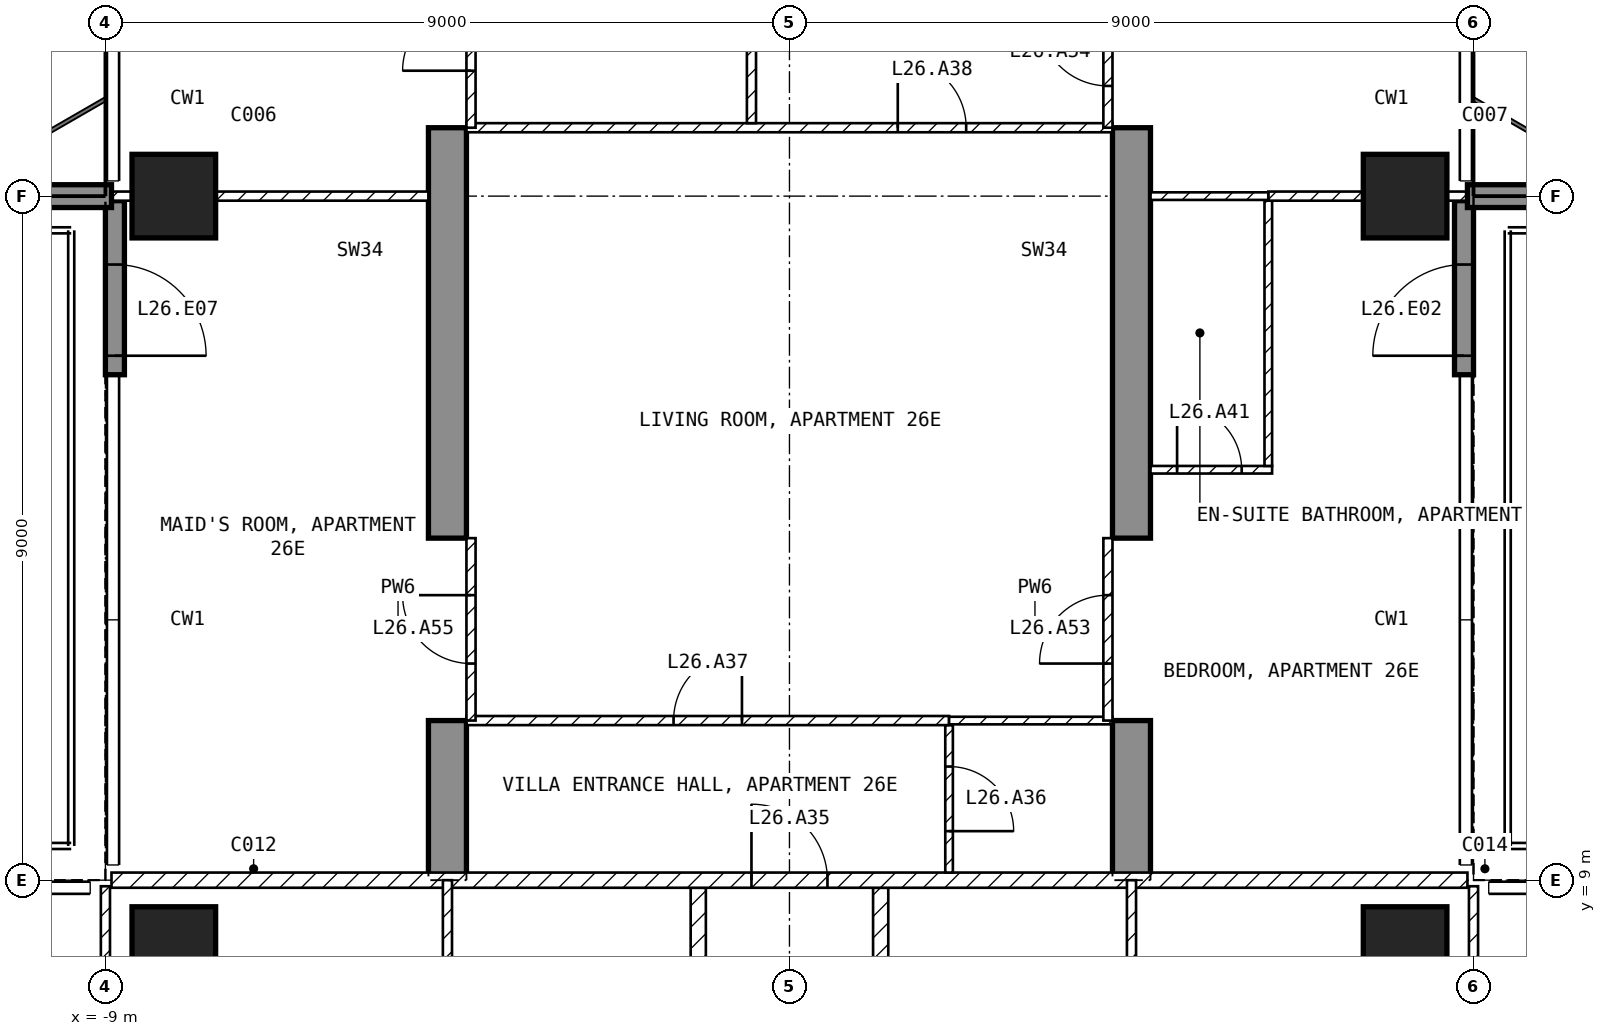
"""IFC4 building model, lengths in metres.
Left out: names, types, materials, properties, quantities, classifications, styles, units other than length and angle.
Written with IfcOpenShell. Run it as: python <this file> out.ifc"""

import sys

from ifc_helpers import new_model, si_unit, direction, frame, frame_2d, origin, origin_2d, place, context, subcontext, project, spatial, polyline, rectangle, outline, extrude, element, fill, save


model = new_model("IFC4")
c1 = context("Model", 3, precision=1e-05, world=origin(), true_north=direction((0.0, 1.0)))
c2 = subcontext(c1, "Body", "Model", "MODEL_VIEW")
j1 = project(units=[si_unit("LENGTHUNIT", "METRE"), si_unit("PLANEANGLEUNIT", "RADIAN")], contexts=[c1])
p1 = place(None, origin())
s1 = spatial("IfcSite", under=j1, at=p1, CompositionType="ELEMENT")
p2 = place(p1, origin())
s2 = spatial("IfcBuilding", under=s1, at=p2, CompositionType="ELEMENT")
p3 = place(p2, frame((0.0, 0.0, 112.9)))
s3 = spatial("IfcBuildingStorey", under=s2, at=p3, CompositionType="ELEMENT", Elevation=112.9)
for number, where, z_axis, x_axis in (
    (1, (-8.1, 8.1, -0.25), (0.0, 0.0, 1.0), (1.0, 0.0, 0.0)),
    (2, (-8.1, 18.0, -0.25), (0.0, 0.0, 1.0), (1.0, 0.0, 0.0)),
    (3, (8.1, 8.1, -0.25), (0.0, 0.0, 1.0), (1.0, 0.0, 0.0)),
    (4, (8.1, 18.0, -0.25), (0.0, 0.0, 1.0), (1.0, 0.0, 0.0)),
):
    element("IfcColumn", number, at=place(p3, frame(where, z_axis=z_axis, x_axis=x_axis)), inside=s3, PredefinedType="COLUMN", context=c2, shape_type="SweptSolid", body=[
        extrude(rectangle(XDim=1.1, YDim=1.1, at=origin_2d()), origin(), (0.0, 0.0, 1.0), 3.5),
    ])
for number, where, z_axis, x_axis in (
    (5, (-4.75, 9.0, -0.25), (1.0, 0.0, 0.0), (0.0, 1.0, 0.0)),
    (6, (4.25, 9.0, -0.25), (1.0, 0.0, 0.0), (0.0, 1.0, 0.0)),
):
    element("IfcWall", number, at=place(p3, frame(where, z_axis=z_axis, x_axis=x_axis)), inside=s3, PredefinedType="SHEAR", context=c2, shape_type="SweptSolid", body=[
        extrude(outline(polyline([(0.0, 0.0), (2.1, 0.0), (2.1, 2.65), (4.5, 2.65), (4.5, 0.0), (9.9, 0.0), (9.9, 2.65), (12.3, 2.65), (12.3, 0.0), (16.55, 0.0), (16.55, 3.5), (0.0, 3.5), (0.0, 0.0)])), origin(), (0.0, 0.0, 1.0), 0.5),
    ])
p4 = place(p3, frame((8.875, 15.65, 0.0), z_axis=(0.0, 0.0, 1.0), x_axis=(0.0, 1.0, 0.0)))
e7 = element("IfcWall", 7, at=p4, inside=s3, PredefinedType="SOLIDWALL", context=c2, shape_type="SweptSolid", body=[
    extrude(rectangle(XDim=2.29, YDim=0.25, at=frame_2d((1.145, 0.0))), origin(), (0.0, 0.0, 1.0), 3.25),
])
p5 = place(p4, frame((0.25, 0.0, 0.0)))
e8 = element("IfcOpeningElement", 8, at=p5, cuts=e7, PredefinedType="OPENING", context=c2, shape_type="SweptSolid", body=[
    extrude(rectangle(XDim=1.2, YDim=2.4, at=frame_2d((0.6, 1.2))), frame((0.0, 0.135, 0.0), z_axis=(0.0, -1.0, 0.0), x_axis=(1.0, 0.0, 0.0)), (0.0, 0.0, 1.0), 0.27),
])
p6 = place(p3, frame((-8.875, 17.94, 0.0), z_axis=(0.0, 0.0, 1.0), x_axis=(0.0, -1.0, 0.0)))
e9 = element("IfcWall", 9, at=p6, inside=s3, PredefinedType="SOLIDWALL", context=c2, shape_type="SweptSolid", body=[
    extrude(rectangle(XDim=2.29, YDim=0.25, at=frame_2d((1.145, 0.0))), origin(), (0.0, 0.0, 1.0), 3.25),
])
p7 = place(p6, frame((0.84, 0.0, 0.0)))
e10 = element("IfcOpeningElement", 10, at=p7, cuts=e9, PredefinedType="OPENING", context=c2, shape_type="SweptSolid", body=[
    extrude(rectangle(XDim=1.2, YDim=2.4, at=frame_2d((0.6, 1.2))), frame((0.0, 0.135, 0.0), z_axis=(0.0, -1.0, 0.0), x_axis=(1.0, 0.0, 0.0)), (0.0, 0.0, 1.0), 0.27),
])
for number, where, z_axis, x_axis in (
    (11, (-8.92, 18.0, 0.0), (0.0, 0.0, 1.0), (-1.0, 0.0, 0.0)),
    (12, (8.92, 18.0, 0.0), (0.0, 0.0, 1.0), (1.0, 0.0, 0.0)),
):
    element("IfcWall", number, at=place(p3, frame(where, z_axis=z_axis, x_axis=x_axis)), inside=s3, PredefinedType="SOLIDWALL", context=c2, shape_type="SweptSolid", body=[
        extrude(rectangle(XDim=2.82, YDim=0.3, at=frame_2d((1.41, 0.0))), origin(), (0.0, 0.0, 1.0), 3.25),
    ])
for number, where, z_axis, x_axis in (
    (13, (1.2, 8.9, 0.0), (0.0, 0.0, 1.0), (0.0, -1.0, 0.0)),
    (14, (-1.2, 4.6, 0.0), (0.0, 0.0, 1.0), (0.0, 1.0, 0.0)),
):
    element("IfcWall", number, at=place(p3, frame(where, z_axis=z_axis, x_axis=x_axis)), inside=s3, PredefinedType="PARTITIONING", context=c2, shape_type="SweptSolid", body=[
        extrude(rectangle(XDim=4.3, YDim=0.2, at=frame_2d((2.15, 0.0))), origin(), (0.0, 0.0, 1.0), 3.25),
    ])
p8 = place(p3, frame((-8.92, 9.0, 0.0), z_axis=(0.0, 0.0, 1.0), x_axis=(1.0, 0.0, 0.0)))
e15 = element("IfcWall", 15, at=p8, inside=s3, PredefinedType="PARTITIONING", context=c2, shape_type="SweptSolid", body=[
    extrude(rectangle(XDim=17.84, YDim=0.2, at=frame_2d((8.92, 0.0))), origin(), (0.0, 0.0, 1.0), 3.25),
])
p9 = place(p8, frame((8.42, 0.0, 0.0)))
e16 = element("IfcOpeningElement", 16, at=p9, cuts=e15, PredefinedType="OPENING", context=c2, shape_type="SweptSolid", body=[
    extrude(rectangle(XDim=1.0, YDim=2.1, at=frame_2d((0.5, 1.05))), frame((0.0, 0.11, 0.0), z_axis=(0.0, -1.0, 0.0), x_axis=(1.0, 0.0, 0.0)), (0.0, 0.0, 1.0), 0.22),
])
p10 = place(p3, frame((9.0, 1.3, 0.0), z_axis=(0.0, 0.0, 1.0), x_axis=(0.0, 1.0, 0.0)))
e17 = element("IfcWall", 17, at=p10, inside=s3, PredefinedType="PARTITIONING", context=c2, shape_type="SweptSolid", body=[
    extrude(rectangle(XDim=7.62, YDim=0.12, at=frame_2d((3.81, 0.0))), origin(), (0.0, 0.0, 1.0), 3.25),
])
p11 = place(p10, frame((1.15, 0.0, 0.0)))
e18 = element("IfcOpeningElement", 18, at=p11, cuts=e17, PredefinedType="OPENING", context=c2, shape_type="SweptSolid", body=[
    extrude(rectangle(XDim=0.9, YDim=2.1, at=frame_2d((0.45, 1.05))), frame((0.0, 0.07, 0.0), z_axis=(0.0, -1.0, 0.0), x_axis=(1.0, 0.0, 0.0)), (0.0, 0.0, 1.0), 0.14),
])
p12 = place(p3, frame((4.5, 4.5, 0.0), z_axis=(0.0, 0.0, 1.0), x_axis=(0.0, 1.0, 0.0)))
e19 = element("IfcWall", 19, at=p12, inside=s3, PredefinedType="PARTITIONING", context=c2, shape_type="SweptSolid", body=[
    extrude(rectangle(XDim=4.5, YDim=0.12, at=frame_2d((2.25, 0.0))), origin(), (0.0, 0.0, 1.0), 3.25),
])
p13 = place(p12, frame((0.24, 0.0, 0.0)))
e20 = element("IfcOpeningElement", 20, at=p13, cuts=e19, PredefinedType="OPENING", context=c2, shape_type="SweptSolid", body=[
    extrude(rectangle(XDim=0.9, YDim=2.1, at=frame_2d((0.45, 1.05))), frame((0.0, 0.07, 0.0), z_axis=(0.0, -1.0, 0.0), x_axis=(1.0, 0.0, 0.0)), (0.0, 0.0, 1.0), 0.14),
])
p14 = place(p3, frame((-9.0, 8.92, 0.0), z_axis=(0.0, 0.0, 1.0), x_axis=(0.0, -1.0, 0.0)))
e21 = element("IfcWall", 21, at=p14, inside=s3, PredefinedType="PARTITIONING", context=c2, shape_type="SweptSolid", body=[
    extrude(rectangle(XDim=7.62, YDim=0.12, at=frame_2d((3.81, 0.0))), origin(), (0.0, 0.0, 1.0), 3.25),
])
p15 = place(p14, frame((2.52, 0.0, 0.0)))
e22 = element("IfcOpeningElement", 22, at=p15, cuts=e21, PredefinedType="OPENING", context=c2, shape_type="SweptSolid", body=[
    extrude(rectangle(XDim=0.9, YDim=2.1, at=frame_2d((0.45, 1.05))), frame((0.0, 0.07, 0.0), z_axis=(0.0, -1.0, 0.0), x_axis=(1.0, 0.0, 0.0)), (0.0, 0.0, 1.0), 0.14),
])
p16 = place(p3, frame((-4.5, 9.0, 0.0), z_axis=(0.0, 0.0, 1.0), x_axis=(0.0, -1.0, 0.0)))
e23 = element("IfcWall", 23, at=p16, inside=s3, PredefinedType="PARTITIONING", context=c2, shape_type="SweptSolid", body=[
    extrude(rectangle(XDim=4.5, YDim=0.12, at=frame_2d((2.25, 0.0))), origin(), (0.0, 0.0, 1.0), 3.25),
])
p17 = place(p16, frame((1.8, 0.0, 0.0)))
e24 = element("IfcOpeningElement", 24, at=p17, cuts=e23, PredefinedType="OPENING", context=c2, shape_type="SweptSolid", body=[
    extrude(rectangle(XDim=0.9, YDim=2.1, at=frame_2d((0.45, 1.05))), frame((0.0, 0.07, 0.0), z_axis=(0.0, -1.0, 0.0), x_axis=(1.0, 0.0, 0.0)), (0.0, 0.0, 1.0), 0.14),
])
p18 = place(p3, frame((2.1, 11.04, 0.0), z_axis=(0.0, 0.0, 1.0), x_axis=(0.0, -1.0, 0.0)))
e25 = element("IfcWall", 25, at=p18, inside=s3, PredefinedType="PARTITIONING", context=c2, shape_type="SweptSolid", body=[
    extrude(rectangle(XDim=1.94, YDim=0.1, at=frame_2d((0.97, 0.0))), origin(), (0.0, 0.0, 1.0), 3.25),
])
p19 = place(p18, frame((0.545, 0.0, 0.0)))
e26 = element("IfcOpeningElement", 26, at=p19, cuts=e25, PredefinedType="OPENING", context=c2, shape_type="SweptSolid", body=[
    extrude(rectangle(XDim=0.85, YDim=2.1, at=frame_2d((0.425, 1.05))), frame((0.0, 0.06, 0.0), z_axis=(0.0, -1.0, 0.0), x_axis=(1.0, 0.0, 0.0)), (0.0, 0.0, 1.0), 0.12),
])
p20 = place(p3, frame((-4.25, 11.1, 0.0), z_axis=(0.0, 0.0, 1.0), x_axis=(1.0, 0.0, 0.0)))
e27 = element("IfcWall", 27, at=p20, inside=s3, PredefinedType="PARTITIONING", context=c2, shape_type="SweptSolid", body=[
    extrude(rectangle(XDim=6.35, YDim=0.12, at=frame_2d((3.175, 0.0))), origin(), (0.0, 0.0, 1.0), 3.25),
])
p21 = place(p20, frame((2.725, 0.0, 0.0)))
e28 = element("IfcOpeningElement", 28, at=p21, cuts=e27, PredefinedType="OPENING", context=c2, shape_type="SweptSolid", body=[
    extrude(rectangle(XDim=0.9, YDim=2.1, at=frame_2d((0.45, 1.05))), frame((0.0, 0.07, 0.0), z_axis=(0.0, -1.0, 0.0), x_axis=(1.0, 0.0, 0.0)), (0.0, 0.0, 1.0), 0.14),
])
p22 = place(p3, frame((2.1, 11.1, 0.0), z_axis=(0.0, 0.0, 1.0), x_axis=(1.0, 0.0, 0.0)))
e29 = element("IfcWall", 29, at=p22, inside=s3, PredefinedType="PARTITIONING", context=c2, shape_type="SweptSolid", body=[
    extrude(rectangle(XDim=2.15, YDim=0.1, at=frame_2d((1.075, 0.0))), origin(), (0.0, 0.0, 1.0), 3.25),
])
p23 = place(p3, frame((-4.25, 18.9, 0.0), z_axis=(0.0, 0.0, 1.0), x_axis=(1.0, 0.0, 0.0)))
e30 = element("IfcWall", 30, at=p23, inside=s3, PredefinedType="PARTITIONING", context=c2, shape_type="SweptSolid", body=[
    extrude(rectangle(XDim=8.5, YDim=0.12, at=frame_2d((4.25, 0.0))), origin(), (0.0, 0.0, 1.0), 3.25),
])
p24 = place(p23, frame((5.675, 0.0, 0.0)))
e31 = element("IfcOpeningElement", 31, at=p24, cuts=e30, PredefinedType="OPENING", context=c2, shape_type="SweptSolid", body=[
    extrude(rectangle(XDim=0.9, YDim=2.1, at=frame_2d((0.45, 1.05))), frame((0.0, 0.07, 0.0), z_axis=(0.0, -1.0, 0.0), x_axis=(1.0, 0.0, 0.0)), (0.0, 0.0, 1.0), 0.14),
])
p25 = place(p3, frame((-0.5, 18.96, 0.0), z_axis=(0.0, 0.0, 1.0), x_axis=(0.0, 1.0, 0.0)))
e32 = element("IfcWall", 32, at=p25, inside=s3, PredefinedType="PARTITIONING", context=c2, shape_type="SweptSolid", body=[
    extrude(rectangle(XDim=4.38, YDim=0.12, at=frame_2d((2.19, 0.0))), origin(), (0.0, 0.0, 1.0), 3.25),
])
p26 = place(p25, frame((1.74, 0.0, 0.0)))
e33 = element("IfcOpeningElement", 33, at=p26, cuts=e32, PredefinedType="OPENING", context=c2, shape_type="SweptSolid", body=[
    extrude(rectangle(XDim=0.9, YDim=2.1, at=frame_2d((0.45, 1.05))), frame((0.0, 0.07, 0.0), z_axis=(0.0, -1.0, 0.0), x_axis=(1.0, 0.0, 0.0)), (0.0, 0.0, 1.0), 0.14),
])
p27 = place(p3, frame((4.75, 14.4, 0.0), z_axis=(0.0, 0.0, 1.0), x_axis=(1.0, 0.0, 0.0)))
e34 = element("IfcWall", 34, at=p27, inside=s3, PredefinedType="PARTITIONING", context=c2, shape_type="SweptSolid", body=[
    extrude(rectangle(XDim=1.6, YDim=0.1, at=frame_2d((0.8, 0.0))), origin(), (0.0, 0.0, 1.0), 3.25),
])
p28 = place(p27, frame((0.35, 0.0, 0.0)))
e35 = element("IfcOpeningElement", 35, at=p28, cuts=e34, PredefinedType="OPENING", context=c2, shape_type="SweptSolid", body=[
    extrude(rectangle(XDim=0.85, YDim=2.1, at=frame_2d((0.425, 1.05))), frame((0.0, 0.06, 0.0), z_axis=(0.0, -1.0, 0.0), x_axis=(1.0, 0.0, 0.0)), (0.0, 0.0, 1.0), 0.12),
])
p29 = place(p3, frame((6.3, 14.45, 0.0), z_axis=(0.0, 0.0, 1.0), x_axis=(0.0, 1.0, 0.0)))
e36 = element("IfcWall", 36, at=p29, inside=s3, PredefinedType="PARTITIONING", context=c2, shape_type="SweptSolid", body=[
    extrude(rectangle(XDim=3.49, YDim=0.1, at=frame_2d((1.745, 0.0))), origin(), (0.0, 0.0, 1.0), 3.25),
])
p30 = place(p3, frame((6.3, 18.0, 0.0), z_axis=(0.0, 0.0, 1.0), x_axis=(1.0, 0.0, 0.0)))
e37 = element("IfcWall", 37, at=p30, inside=s3, PredefinedType="PARTITIONING", context=c2, shape_type="SweptSolid", body=[
    extrude(rectangle(XDim=2.62, YDim=0.12, at=frame_2d((1.31, 0.0))), origin(), (0.0, 0.0, 1.0), 2.414),
])
p31 = place(p3, frame((4.75, 18.0, 0.0), z_axis=(0.0, 0.0, 1.0), x_axis=(1.0, 0.0, 0.0)))
e38 = element("IfcWall", 38, at=p31, inside=s3, PredefinedType="PARTITIONING", context=c2, shape_type="SweptSolid", body=[
    extrude(rectangle(XDim=1.55, YDim=0.1, at=frame_2d((0.775, 0.0))), origin(), (0.0, 0.0, 1.0), 2.414),
])
p32 = place(p3, frame((-8.92, 18.0, 0.0), z_axis=(0.0, 0.0, 1.0), x_axis=(1.0, 0.0, 0.0)))
e39 = element("IfcWall", 39, at=p32, inside=s3, PredefinedType="PARTITIONING", context=c2, shape_type="SweptSolid", body=[
    extrude(rectangle(XDim=4.17, YDim=0.12, at=frame_2d((2.085, 0.0))), origin(), (0.0, 0.0, 1.0), 2.414),
])
p33 = place(p3, frame((4.19, 11.1, 0.0), z_axis=(0.0, 0.0, 1.0), x_axis=(0.0, 1.0, 0.0)))
e40 = element("IfcWall", 40, at=p33, inside=s3, PredefinedType="PARTITIONING", context=c2, shape_type="SweptSolid", body=[
    extrude(rectangle(XDim=2.4, YDim=0.12, at=frame_2d((1.2, 0.0))), origin(), (0.0, 0.0, 1.0), 2.4),
])
p34 = place(p33, frame((0.75, 0.0, 0.0)))
e41 = element("IfcOpeningElement", 41, at=p34, cuts=e40, PredefinedType="OPENING", context=c2, shape_type="SweptSolid", body=[
    extrude(rectangle(XDim=0.9, YDim=2.1, at=frame_2d((0.45, 1.05))), frame((0.0, 0.07, 0.0), z_axis=(0.0, -1.0, 0.0), x_axis=(1.0, 0.0, 0.0)), (0.0, 0.0, 1.0), 0.14),
])
p35 = place(p3, frame((4.19, 18.9, 0.0), z_axis=(0.0, 0.0, 1.0), x_axis=(0.0, 1.0, 0.0)))
e42 = element("IfcWall", 42, at=p35, inside=s3, PredefinedType="PARTITIONING", context=c2, shape_type="SweptSolid", body=[
    extrude(rectangle(XDim=2.4, YDim=0.12, at=frame_2d((1.2, 0.0))), origin(), (0.0, 0.0, 1.0), 2.4),
])
p36 = place(p35, frame((0.55, 0.0, 0.0)))
e43 = element("IfcOpeningElement", 43, at=p36, cuts=e42, PredefinedType="OPENING", context=c2, shape_type="SweptSolid", body=[
    extrude(rectangle(XDim=0.9, YDim=2.1, at=frame_2d((0.45, 1.05))), frame((0.0, 0.07, 0.0), z_axis=(0.0, -1.0, 0.0), x_axis=(1.0, 0.0, 0.0)), (0.0, 0.0, 1.0), 0.14),
])
p37 = place(p3, frame((-4.19, 11.1, 0.0), z_axis=(0.0, 0.0, 1.0), x_axis=(0.0, 1.0, 0.0)))
e44 = element("IfcWall", 44, at=p37, inside=s3, PredefinedType="PARTITIONING", context=c2, shape_type="SweptSolid", body=[
    extrude(rectangle(XDim=2.4, YDim=0.12, at=frame_2d((1.2, 0.0))), origin(), (0.0, 0.0, 1.0), 2.4),
])
p38 = place(p37, frame((0.75, 0.0, 0.0)))
e45 = element("IfcOpeningElement", 45, at=p38, cuts=e44, PredefinedType="OPENING", context=c2, shape_type="SweptSolid", body=[
    extrude(rectangle(XDim=0.9, YDim=2.1, at=frame_2d((0.45, 1.05))), frame((0.0, 0.07, 0.0), z_axis=(0.0, -1.0, 0.0), x_axis=(1.0, 0.0, 0.0)), (0.0, 0.0, 1.0), 0.14),
])
p39 = place(p3, frame((-4.19, 18.9, 0.0), z_axis=(0.0, 0.0, 1.0), x_axis=(0.0, 1.0, 0.0)))
e46 = element("IfcWall", 46, at=p39, inside=s3, PredefinedType="PARTITIONING", context=c2, shape_type="SweptSolid", body=[
    extrude(rectangle(XDim=2.4, YDim=0.12, at=frame_2d((1.2, 0.0))), origin(), (0.0, 0.0, 1.0), 2.4),
])
p40 = place(p39, frame((0.75, 0.0, 0.0)))
e47 = element("IfcOpeningElement", 47, at=p40, cuts=e46, PredefinedType="OPENING", context=c2, shape_type="SweptSolid", body=[
    extrude(rectangle(XDim=0.9, YDim=2.1, at=frame_2d((0.45, 1.05))), frame((0.0, 0.07, 0.0), z_axis=(0.0, -1.0, 0.0), x_axis=(1.0, 0.0, 0.0)), (0.0, 0.0, 1.0), 0.14),
])
p41 = place(p5, origin())
e48 = element("IfcDoor", 48, at=p41, inside=s3, OperationType="SINGLE_SWING_LEFT", PredefinedType="DOOR", context=c2, shape_type="SweptSolid", body=[
    extrude(rectangle(XDim=1.2, YDim=2.4, at=frame_2d((0.6, 1.2))), frame((0.0, 0.025, 0.0), z_axis=(0.0, -1.0, 0.0), x_axis=(1.0, 0.0, 0.0)), (0.0, 0.0, 1.0), 0.05),
])
fill(e8, e48)
p42 = place(p7, origin())
e49 = element("IfcDoor", 49, at=p42, inside=s3, OperationType="SINGLE_SWING_RIGHT", PredefinedType="DOOR", context=c2, shape_type="SweptSolid", body=[
    extrude(rectangle(XDim=1.2, YDim=2.4, at=frame_2d((0.6, 1.2))), frame((0.0, 0.025, 0.0), z_axis=(0.0, -1.0, 0.0), x_axis=(1.0, 0.0, 0.0)), (0.0, 0.0, 1.0), 0.05),
])
fill(e10, e49)
p43 = place(p9, origin())
e50 = element("IfcDoor", 50, at=p43, inside=s3, OperationType="SINGLE_SWING_LEFT", PredefinedType="DOOR", context=c2, shape_type="SweptSolid", body=[
    extrude(rectangle(XDim=1.0, YDim=2.1, at=frame_2d((0.5, 1.05))), frame((0.0, 0.025, 0.0), z_axis=(0.0, -1.0, 0.0), x_axis=(1.0, 0.0, 0.0)), (0.0, 0.0, 1.0), 0.05),
])
fill(e16, e50)
p44 = place(p19, origin())
e51 = element("IfcDoor", 51, at=p44, inside=s3, OperationType="SINGLE_SWING_RIGHT", PredefinedType="DOOR", context=c2, shape_type="SweptSolid", body=[
    extrude(rectangle(XDim=0.85, YDim=2.1, at=frame_2d((0.425, 1.05))), frame((0.0, 0.025, 0.0), z_axis=(0.0, -1.0, 0.0), x_axis=(1.0, 0.0, 0.0)), (0.0, 0.0, 1.0), 0.05),
])
fill(e26, e51)
p45 = place(p21, origin())
e52 = element("IfcDoor", 52, at=p45, inside=s3, OperationType="SINGLE_SWING_RIGHT", PredefinedType="DOOR", context=c2, shape_type="SweptSolid", body=[
    extrude(rectangle(XDim=0.9, YDim=2.1, at=frame_2d((0.45, 1.05))), frame((0.0, 0.025, 0.0), z_axis=(0.0, -1.0, 0.0), x_axis=(1.0, 0.0, 0.0)), (0.0, 0.0, 1.0), 0.05),
])
fill(e28, e52)
p46 = place(p24, origin())
e53 = element("IfcDoor", 53, at=p46, inside=s3, OperationType="SINGLE_SWING_LEFT", PredefinedType="DOOR", context=c2, shape_type="SweptSolid", body=[
    extrude(rectangle(XDim=0.9, YDim=2.1, at=frame_2d((0.45, 1.05))), frame((0.0, 0.025, 0.0), z_axis=(0.0, -1.0, 0.0), x_axis=(1.0, 0.0, 0.0)), (0.0, 0.0, 1.0), 0.05),
])
fill(e31, e53)
p47 = place(p28, origin())
e54 = element("IfcDoor", 54, at=p47, inside=s3, OperationType="SINGLE_SWING_LEFT", PredefinedType="DOOR", context=c2, shape_type="SweptSolid", body=[
    extrude(rectangle(XDim=0.85, YDim=2.1, at=frame_2d((0.425, 1.05))), frame((0.0, 0.025, 0.0), z_axis=(0.0, -1.0, 0.0), x_axis=(1.0, 0.0, 0.0)), (0.0, 0.0, 1.0), 0.05),
])
fill(e35, e54)
p48 = place(p34, origin())
e55 = element("IfcDoor", 55, at=p48, inside=s3, OperationType="SINGLE_SWING_LEFT", PredefinedType="DOOR", context=c2, shape_type="SweptSolid", body=[
    extrude(rectangle(XDim=0.9, YDim=2.1, at=frame_2d((0.45, 1.05))), frame((0.0, 0.025, 0.0), z_axis=(0.0, -1.0, 0.0), x_axis=(1.0, 0.0, 0.0)), (0.0, 0.0, 1.0), 0.05),
])
fill(e41, e55)
p49 = place(p36, origin())
e56 = element("IfcDoor", 56, at=p49, inside=s3, OperationType="SINGLE_SWING_RIGHT", PredefinedType="DOOR", context=c2, shape_type="SweptSolid", body=[
    extrude(rectangle(XDim=0.9, YDim=2.1, at=frame_2d((0.45, 1.05))), frame((0.0, 0.025, 0.0), z_axis=(0.0, -1.0, 0.0), x_axis=(1.0, 0.0, 0.0)), (0.0, 0.0, 1.0), 0.05),
])
fill(e43, e56)
p50 = place(p38, origin())
e57 = element("IfcDoor", 57, at=p50, inside=s3, OperationType="SINGLE_SWING_RIGHT", PredefinedType="DOOR", context=c2, shape_type="SweptSolid", body=[
    extrude(rectangle(XDim=0.9, YDim=2.1, at=frame_2d((0.45, 1.05))), frame((0.0, 0.025, 0.0), z_axis=(0.0, -1.0, 0.0), x_axis=(1.0, 0.0, 0.0)), (0.0, 0.0, 1.0), 0.05),
])
fill(e45, e57)
p51 = place(p40, origin())
e58 = element("IfcDoor", 58, at=p51, inside=s3, OperationType="SINGLE_SWING_LEFT", PredefinedType="DOOR", context=c2, shape_type="SweptSolid", body=[
    extrude(rectangle(XDim=0.9, YDim=2.1, at=frame_2d((0.45, 1.05))), frame((0.0, 0.025, 0.0), z_axis=(0.0, -1.0, 0.0), x_axis=(1.0, 0.0, 0.0)), (0.0, 0.0, 1.0), 0.05),
])
fill(e47, e58)
save(model, sys.argv[1])
